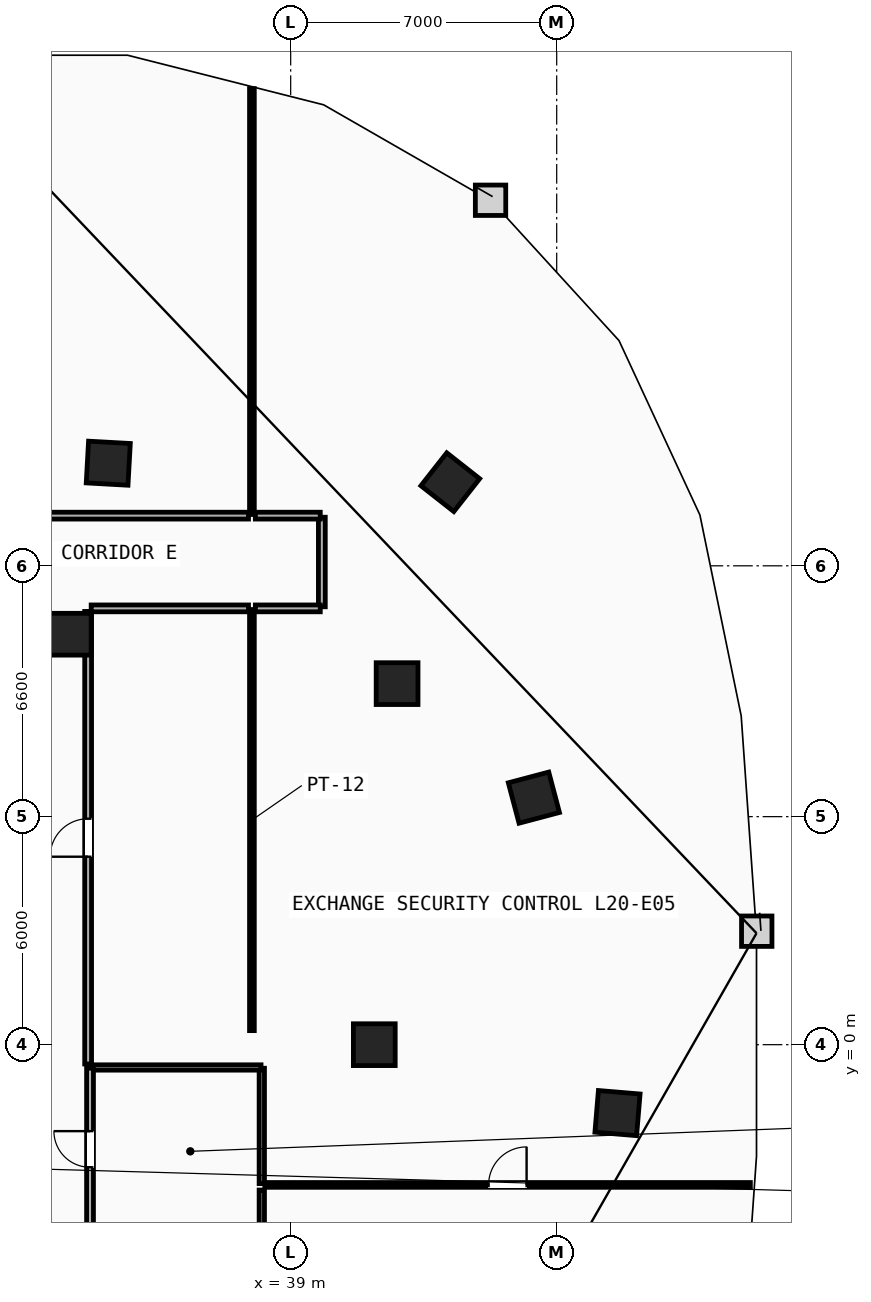
"""IFC4 building model, lengths in metres.
Left out: names, types, materials, properties, quantities, classifications, styles, units other than length and angle.
Written with IfcOpenShell. Run it as: python <this file> out.ifc"""

import sys

from ifc_helpers import new_model, si_unit, direction, frame, frame_2d, origin, origin_2d, place, context, subcontext, project, spatial, rectangle, extrude, element, fill, save


model = new_model("IFC4")
c1 = context("Model", 3, precision=1e-05, world=origin(), true_north=direction((0.0, 1.0)))
c2 = subcontext(c1, "Body", "Model", "MODEL_VIEW")
j1 = project(units=[si_unit("LENGTHUNIT", "METRE"), si_unit("PLANEANGLEUNIT", "RADIAN")], contexts=[c1])
p1 = place(None, origin())
s1 = spatial("IfcSite", under=j1, at=p1, CompositionType="ELEMENT")
p2 = place(p1, origin())
s2 = spatial("IfcBuilding", under=s1, at=p2, CompositionType="ELEMENT")
p3 = place(p2, frame((0.0, 0.0, 81.8)))
s3 = spatial("IfcBuildingStorey", under=s2, at=p3, CompositionType="ELEMENT", Elevation=81.8)
for number, where, z_axis, x_axis in (
    (1, (41.2, 0.0, 0.0), (0.0, 0.0, 1.0), (1.0, 0.0, 0.0)),
    (2, (41.8, 9.5, 0.0), (0.0, 0.0, 1.0), (1.0, 0.0, 0.0)),
    (3, (33.2, 10.8, 0.0), (0.0, 0.0, 1.0), (1.0, 0.0, 0.0)),
    (4, (47.6, -1.8, 0.0), (0.0, 0.0, 1.0), (0.084, 0.997, 0.0)),
    (5, (45.4, 6.5, 0.0), (0.0, 0.0, 1.0), (-0.256, 0.967, 0.0)),
    (6, (43.2, 14.8, 0.0), (0.0, 0.0, 1.0), (-0.786, 0.618, 0.0)),
    (7, (34.2, 15.3, 0.0), (0.0, 0.0, 1.0), (-0.998, 0.055, 0.0)),
):
    element("IfcColumn", number, at=place(p3, frame(where, z_axis=z_axis, x_axis=x_axis)), inside=s3, PredefinedType="COLUMN", context=c2, shape_type="SweptSolid", body=[
        extrude(rectangle(XDim=1.1, YDim=1.1, at=origin_2d()), origin(), (0.0, 0.0, 1.0), 3.6),
    ])
p4 = place(p3, frame((38.24, -4.895, 0.0), z_axis=(0.0, 0.0, 1.0), x_axis=(0.0, 1.0, 0.0)))
e8 = element("IfcWall", 8, at=p4, inside=s3, PredefinedType="PARTITIONING", context=c2, shape_type="SweptSolid", body=[
    extrude(rectangle(XDim=1.07, YDim=0.14, at=frame_2d((0.535, 0.0))), origin(), (0.0, 0.0, 1.0), 3.3),
])
p5 = place(p3, frame((38.24, -3.655, 0.0), z_axis=(0.0, 0.0, 1.0), x_axis=(0.0, 1.0, 0.0)))
e9 = element("IfcWall", 9, at=p5, inside=s3, PredefinedType="PARTITIONING", context=c2, shape_type="SweptSolid", body=[
    extrude(rectangle(XDim=3.035, YDim=0.14, at=frame_2d((1.518, 0.0))), origin(), (0.0, 0.0, 1.0), 3.3),
])
p6 = place(p3, frame((33.74, -0.6, 0.0), z_axis=(0.0, 0.0, 1.0), x_axis=(1.0, 0.0, 0.0)))
e10 = element("IfcWall", 10, at=p6, inside=s3, PredefinedType="PARTITIONING", context=c2, shape_type="SweptSolid", body=[
    extrude(rectangle(XDim=4.48, YDim=0.14, at=frame_2d((2.24, 0.0))), origin(), (0.0, 0.0, 1.0), 3.3),
])
p7 = place(p3, frame((33.72, -4.88, 0.0), z_axis=(0.0, 0.0, 1.0), x_axis=(0.0, 1.0, 0.0)))
e11 = element("IfcWall", 11, at=p7, inside=s3, PredefinedType="PARTITIONING", context=c2, shape_type="SweptSolid", body=[
    extrude(rectangle(XDim=4.26, YDim=0.18, at=frame_2d((2.13, 0.0))), origin(), (0.0, 0.0, 1.0), 3.3),
])
p8 = place(p7, frame((1.655, 0.0, 0.0)))
e12 = element("IfcOpeningElement", 12, at=p8, cuts=e11, PredefinedType="OPENING", context=c2, shape_type="SweptSolid", body=[
    extrude(rectangle(XDim=0.95, YDim=2.1, at=frame_2d((0.475, 1.05))), frame((0.0, 0.1, 0.0), z_axis=(0.0, -1.0, 0.0), x_axis=(1.0, 0.0, 0.0)), (0.0, 0.0, 1.0), 0.2),
])
p9 = place(p3, frame((37.98, 0.37, 0.0), z_axis=(0.0, 0.0, 1.0), x_axis=(0.0, 1.0, 0.0)))
e13 = element("IfcWall", 13, at=p9, inside=s3, PredefinedType="PARTITIONING", context=c2, shape_type="SweptSolid", body=[
    extrude(rectangle(XDim=11.08, YDim=0.125, at=frame_2d((5.54, 0.0))), origin(), (0.0, 0.0, 1.0), 3.3),
])
p10 = place(p3, frame((37.98, 13.95, 0.0), z_axis=(0.0, 0.0, 1.0), x_axis=(0.0, 1.0, 0.0)))
e14 = element("IfcWall", 14, at=p10, inside=s3, PredefinedType="PARTITIONING", context=c2, shape_type="SweptSolid", body=[
    extrude(rectangle(XDim=11.207, YDim=0.125, at=frame_2d((5.603, 0.0))), origin(), (0.0, 0.0, 1.0), 3.3),
])
p11 = place(p3, frame((37.89, 13.92, 0.0), z_axis=(0.0, 0.0, 1.0), x_axis=(-1.0, 0.0, 0.0)))
e15 = element("IfcWall", 15, at=p11, inside=s3, PredefinedType="PARTITIONING", context=c2, shape_type="SweptSolid", body=[
    extrude(rectangle(XDim=12.668, YDim=0.18, at=frame_2d((6.334, 0.0))), origin(), (0.0, 0.0, 1.0), 3.3),
])
p12 = place(p3, frame((33.67, -0.509, 0.0), z_axis=(0.0, 0.0, 1.0), x_axis=(0.0, 1.0, 0.0)))
e16 = element("IfcWall", 16, at=p12, inside=s3, PredefinedType="PARTITIONING", context=c2, shape_type="SweptSolid", body=[
    extrude(rectangle(XDim=11.908, YDim=0.18, at=frame_2d((5.954, 0.0))), origin(), (0.0, 0.0, 1.0), 3.3),
])
p13 = place(p12, frame((5.454, 0.0, 0.0)))
e17 = element("IfcOpeningElement", 17, at=p13, cuts=e16, PredefinedType="OPENING", context=c2, shape_type="SweptSolid", body=[
    extrude(rectangle(XDim=1.0, YDim=2.15, at=frame_2d((0.5, 1.075))), frame((0.0, 0.1, 0.0), z_axis=(0.0, -1.0, 0.0), x_axis=(1.0, 0.0, 0.0)), (0.0, 0.0, 1.0), 0.2),
])
p14 = place(p3, frame((33.75, 11.48, 0.0), z_axis=(0.0, 0.0, 1.0), x_axis=(1.0, 0.0, 0.0)))
e18 = element("IfcWall", 18, at=p14, inside=s3, PredefinedType="PARTITIONING", context=c2, shape_type="SweptSolid", body=[
    extrude(rectangle(XDim=4.14, YDim=0.18, at=frame_2d((2.07, 0.0))), origin(), (0.0, 0.0, 1.0), 3.3),
])
p15 = place(p3, frame((39.82, 11.521, 0.0), z_axis=(0.0, 0.0, 1.0), x_axis=(0.0, 1.0, 0.0)))
e19 = element("IfcWall", 19, at=p15, inside=s3, PredefinedType="PARTITIONING", context=c2, shape_type="SweptSolid", body=[
    extrude(rectangle(XDim=2.357, YDim=0.18, at=frame_2d((1.178, 0.0))), origin(), (0.0, 0.0, 1.0), 3.3),
])
for number, where, z_axis, x_axis in (
    (20, (38.07, 11.48, 0.0), (0.0, 0.0, 1.0), (1.0, 0.0, 0.0)),
    (21, (39.779, 13.92, 0.0), (0.0, 0.0, 1.0), (-1.0, 0.0, 0.0)),
):
    element("IfcWall", number, at=place(p3, frame(where, z_axis=z_axis, x_axis=x_axis)), inside=s3, PredefinedType="PARTITIONING", context=c2, shape_type="SweptSolid", body=[
        extrude(rectangle(XDim=1.708, YDim=0.18, at=frame_2d((0.854, 0.0))), origin(), (0.0, 0.0, 1.0), 3.3),
    ])
p16 = place(p3, frame((38.32, -3.69, 0.0), z_axis=(0.0, 0.0, 1.0), x_axis=(1.0, 0.0, 0.0)))
e22 = element("IfcWall", 22, at=p16, inside=s3, PredefinedType="PARTITIONING", context=c2, shape_type="SweptSolid", body=[
    extrude(rectangle(XDim=12.776, YDim=0.125, at=frame_2d((6.388, 0.0))), origin(), (0.0, 0.0, 1.0), 3.3),
])
p17 = place(p16, frame((5.888, 0.0, 0.0)))
e23 = element("IfcOpeningElement", 23, at=p17, cuts=e22, PredefinedType="OPENING", context=c2, shape_type="SweptSolid", body=[
    extrude(rectangle(XDim=1.0, YDim=2.15, at=frame_2d((0.5, 1.075))), frame((0.0, 0.073, 0.0), z_axis=(0.0, -1.0, 0.0), x_axis=(1.0, 0.0, 0.0)), (0.0, 0.0, 1.0), 0.145),
])
p18 = place(p17, origin())
e24 = element("IfcDoor", 24, at=p18, inside=s3, OperationType="SINGLE_SWING_RIGHT", PredefinedType="DOOR", context=c2, shape_type="SweptSolid", body=[
    extrude(rectangle(XDim=1.0, YDim=2.15, at=frame_2d((0.5, 1.075))), frame((0.0, 0.025, 0.0), z_axis=(0.0, -1.0, 0.0), x_axis=(1.0, 0.0, 0.0)), (0.0, 0.0, 1.0), 0.05),
])
fill(e23, e24)
p19 = place(p13, origin())
e25 = element("IfcDoor", 25, at=p19, inside=s3, OperationType="SINGLE_SWING_LEFT", PredefinedType="DOOR", context=c2, shape_type="SweptSolid", body=[
    extrude(rectangle(XDim=1.0, YDim=2.15, at=frame_2d((0.5, 1.075))), frame((0.0, 0.025, 0.0), z_axis=(0.0, -1.0, 0.0), x_axis=(1.0, 0.0, 0.0)), (0.0, 0.0, 1.0), 0.05),
])
fill(e17, e25)
p20 = place(p8, origin())
e26 = element("IfcDoor", 26, at=p20, inside=s3, OperationType="SINGLE_SWING_RIGHT", PredefinedType="DOOR", context=c2, shape_type="SweptSolid", body=[
    extrude(rectangle(XDim=0.95, YDim=2.1, at=frame_2d((0.475, 1.05))), frame((0.0, 0.025, 0.0), z_axis=(0.0, -1.0, 0.0), x_axis=(1.0, 0.0, 0.0)), (0.0, 0.0, 1.0), 0.05),
])
fill(e12, e26)
save(model, sys.argv[1])
